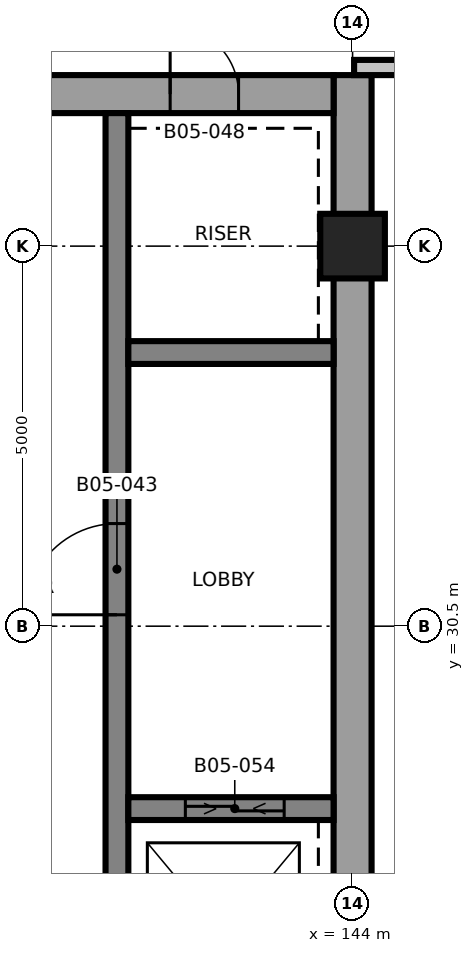
"""IFC4 building model, lengths in metres.
Left out: names, types, materials, properties, quantities, classifications, styles, units other than length and angle.
Written with IfcOpenShell. Run it as: python <this file> out.ifc"""

import sys

from ifc_helpers import new_model, si_unit, direction, frame, frame_2d, origin, origin_2d, place, context, subcontext, project, spatial, rectangle, extrude, element, fill, save


model = new_model("IFC4")
c1 = context("Model", 3, precision=1e-05, world=origin(), true_north=direction((0.0, 1.0)))
c2 = subcontext(c1, "Body", "Model", "MODEL_VIEW")
j1 = project(units=[si_unit("LENGTHUNIT", "METRE"), si_unit("PLANEANGLEUNIT", "RADIAN")], contexts=[c1])
p1 = place(None, origin())
s1 = spatial("IfcSite", under=j1, at=p1, CompositionType="ELEMENT")
p2 = place(p1, origin())
s2 = spatial("IfcBuilding", under=s1, at=p2, CompositionType="ELEMENT")
p3 = place(p2, frame((0.0, 0.0, 74.2)))
s3 = spatial("IfcBuildingStorey", under=s2, at=p3, CompositionType="ELEMENT", Elevation=74.2)
p4 = place(p3, frame((144.0, 24.25, 0.0), z_axis=(0.0, 0.0, 1.0), x_axis=(0.0, 1.0, 0.0)))
e1 = element("IfcWall", 1, at=p4, inside=s3, PredefinedType="SHEAR", context=c2, shape_type="SweptSolid", body=[
    extrude(rectangle(XDim=13.5, YDim=0.5, at=frame_2d((6.75, 0.0))), origin(), (0.0, 0.0, 1.0), 3.7),
])
p5 = place(p3, frame((128.75, 37.5, 0.0), z_axis=(0.0, 0.0, 1.0), x_axis=(1.0, 0.0, 0.0)))
e2 = element("IfcWall", 2, at=p5, inside=s3, PredefinedType="SHEAR", context=c2, shape_type="SweptSolid", body=[
    extrude(rectangle(XDim=15.0, YDim=0.5, at=frame_2d((7.5, 0.0))), origin(), (0.0, 0.0, 1.0), 3.7),
])
p6 = place(p5, frame((9.65, 0.0, 0.0)))
e3 = element("IfcOpeningElement", 3, at=p6, cuts=e2, PredefinedType="OPENING", context=c2, shape_type="SweptSolid", body=[
    extrude(rectangle(XDim=1.5, YDim=2.1, at=frame_2d((0.75, 1.05))), frame((0.0, 0.26, 0.0), z_axis=(0.0, -1.0, 0.0), x_axis=(1.0, 0.0, 0.0)), (0.0, 0.0, 1.0), 0.52),
])
p7 = place(p5, frame((12.85, 0.0, 0.0)))
e4 = element("IfcOpeningElement", 4, at=p7, cuts=e2, PredefinedType="OPENING", context=c2, shape_type="SweptSolid", body=[
    extrude(rectangle(XDim=0.9, YDim=2.1, at=frame_2d((0.45, 1.05))), frame((0.0, 0.26, 0.0), z_axis=(0.0, -1.0, 0.0), x_axis=(1.0, 0.0, 0.0)), (0.0, 0.0, 1.0), 0.52),
])
p8 = place(p5, frame((4.1, 0.0, 0.0)))
e5 = element("IfcOpeningElement", 5, at=p8, cuts=e2, PredefinedType="OPENING", context=c2, shape_type="SweptSolid", body=[
    extrude(rectangle(XDim=0.9, YDim=2.1, at=frame_2d((0.45, 1.05))), frame((0.0, 0.26, 0.0), z_axis=(0.0, -1.0, 0.0), x_axis=(1.0, 0.0, 0.0)), (0.0, 0.0, 1.0), 0.52),
])
p9 = place(p5, frame((7.0, 0.0, 0.0)))
e6 = element("IfcOpeningElement", 6, at=p9, cuts=e2, PredefinedType="OPENING", context=c2, shape_type="SweptSolid", body=[
    extrude(rectangle(XDim=0.9, YDim=2.1, at=frame_2d((0.45, 1.05))), frame((0.0, 0.26, 0.0), z_axis=(0.0, -1.0, 0.0), x_axis=(1.0, 0.0, 0.0)), (0.0, 0.0, 1.0), 0.52),
])
p10 = place(p3, frame((140.9, 24.75, 0.0), z_axis=(0.0, 0.0, 1.0), x_axis=(0.0, 1.0, 0.0)))
e7 = element("IfcWall", 7, at=p10, inside=s3, PredefinedType="SHEAR", context=c2, shape_type="SweptSolid", body=[
    extrude(rectangle(XDim=12.5, YDim=0.3, at=frame_2d((6.25, 0.0))), origin(), (0.0, 0.0, 1.0), 3.7),
])
p11 = place(p10, frame((5.9, 0.0, 0.0)))
e8 = element("IfcOpeningElement", 8, at=p11, cuts=e7, PredefinedType="OPENING", context=c2, shape_type="SweptSolid", body=[
    extrude(rectangle(XDim=1.2, YDim=2.1, at=frame_2d((0.6, 1.05))), frame((0.0, 0.16, 0.0), z_axis=(0.0, -1.0, 0.0), x_axis=(1.0, 0.0, 0.0)), (0.0, 0.0, 1.0), 0.32),
])
p12 = place(p3, frame((141.05, 28.1, 0.0), z_axis=(0.0, 0.0, 1.0), x_axis=(1.0, 0.0, 0.0)))
e9 = element("IfcWall", 9, at=p12, inside=s3, PredefinedType="SHEAR", context=c2, shape_type="SweptSolid", body=[
    extrude(rectangle(XDim=2.7, YDim=0.3, at=frame_2d((1.35, 0.0))), origin(), (0.0, 0.0, 1.0), 3.7),
])
p13 = place(p12, frame((0.75, 0.0, 0.0)))
e10 = element("IfcOpeningElement", 10, at=p13, cuts=e9, PredefinedType="OPENING", context=c2, shape_type="SweptSolid", body=[
    extrude(rectangle(XDim=1.3, YDim=2.4, at=frame_2d((0.65, 1.2))), frame((0.0, 0.16, 0.0), z_axis=(0.0, -1.0, 0.0), x_axis=(1.0, 0.0, 0.0)), (0.0, 0.0, 1.0), 0.32),
])
p14 = place(p3, frame((141.05, 34.1, 0.0), z_axis=(0.0, 0.0, 1.0), x_axis=(1.0, 0.0, 0.0)))
e11 = element("IfcWall", 11, at=p14, inside=s3, PredefinedType="SHEAR", context=c2, shape_type="SweptSolid", body=[
    extrude(rectangle(XDim=2.7, YDim=0.3, at=frame_2d((1.35, 0.0))), origin(), (0.0, 0.0, 1.0), 3.7),
])
p15 = place(p3, frame((144.0, 35.5, 0.0), z_axis=(0.0, 0.0, 1.0), x_axis=(1.0, 0.0, 0.0)))
e12 = element("IfcColumn", 12, at=p15, inside=s3, PredefinedType="COLUMN", context=c2, shape_type="SweptSolid", body=[
    extrude(rectangle(XDim=0.85, YDim=0.85, at=origin_2d()), origin(), (0.0, 0.0, 1.0), 3.7),
])
p16 = place(p3, frame((144.02, 37.85, 0.0), z_axis=(0.0, 0.0, 1.0), x_axis=(1.0, 0.0, 0.0)))
e13 = element("IfcWall", 13, at=p16, inside=s3, PredefinedType="PARTITIONING", context=c2, shape_type="SweptSolid", body=[
    extrude(rectangle(XDim=3.23, YDim=0.2, at=frame_2d((1.615, 0.0))), origin(), (0.0, 0.0, 1.0), 3.4),
])
p17 = place(p16, frame((1.03, 0.0, 0.0)))
e14 = element("IfcOpeningElement", 14, at=p17, cuts=e13, PredefinedType="OPENING", context=c2, shape_type="SweptSolid", body=[
    extrude(rectangle(XDim=1.5, YDim=2.1, at=frame_2d((0.75, 1.05))), frame((0.0, 0.11, 0.0), z_axis=(0.0, -1.0, 0.0), x_axis=(1.0, 0.0, 0.0)), (0.0, 0.0, 1.0), 0.22),
])
p18 = place(p11, origin())
e15 = element("IfcDoor", 15, at=p18, inside=s3, OperationType="SINGLE_SWING_RIGHT", PredefinedType="DOOR", context=c2, shape_type="SweptSolid", body=[
    extrude(rectangle(XDim=1.2, YDim=2.1, at=frame_2d((0.6, 1.05))), frame((0.0, 0.025, 0.0), z_axis=(0.0, -1.0, 0.0), x_axis=(1.0, 0.0, 0.0)), (0.0, 0.0, 1.0), 0.05),
])
fill(e8, e15)
p19 = place(p7, origin())
e16 = element("IfcDoor", 16, at=p19, inside=s3, OperationType="SINGLE_SWING_RIGHT", PredefinedType="DOOR", context=c2, shape_type="SweptSolid", body=[
    extrude(rectangle(XDim=0.9, YDim=2.1, at=frame_2d((0.45, 1.05))), frame((0.0, 0.025, 0.0), z_axis=(0.0, -1.0, 0.0), x_axis=(1.0, 0.0, 0.0)), (0.0, 0.0, 1.0), 0.05),
])
fill(e4, e16)
p20 = place(p13, origin())
e17 = element("IfcDoor", 17, at=p20, inside=s3, OperationType="SLIDING_TO_LEFT", PredefinedType="DOOR", context=c2, shape_type="SweptSolid", body=[
    extrude(rectangle(XDim=1.3, YDim=2.4, at=frame_2d((0.65, 1.2))), frame((0.0, 0.025, 0.0), z_axis=(0.0, -1.0, 0.0), x_axis=(1.0, 0.0, 0.0)), (0.0, 0.0, 1.0), 0.05),
])
fill(e10, e17)
save(model, sys.argv[1])
